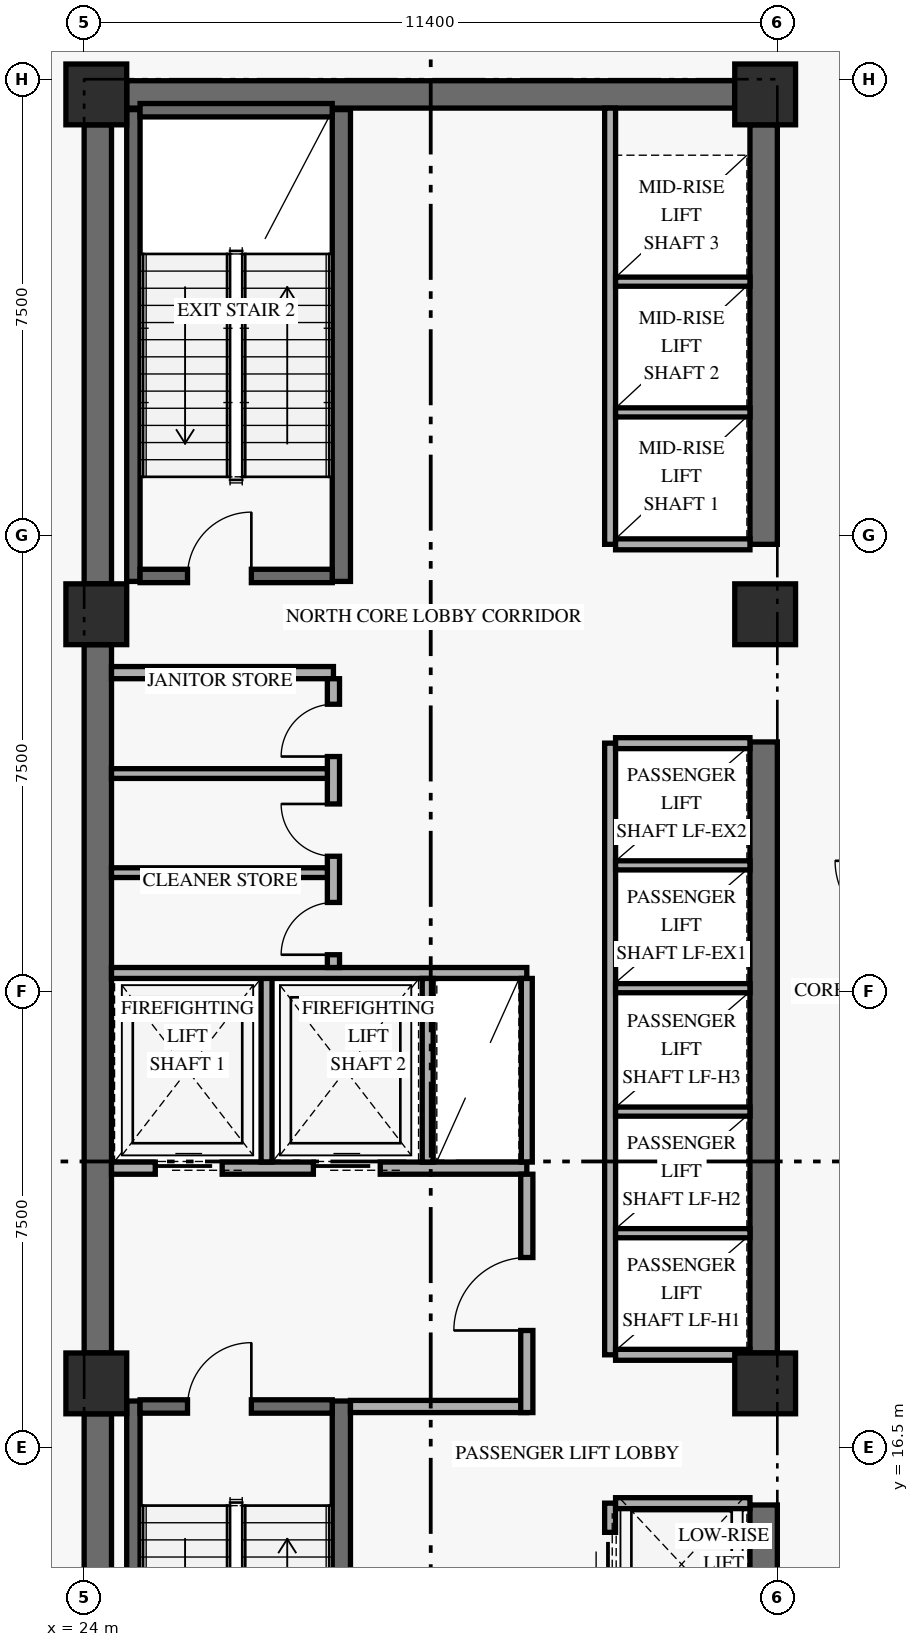
"""IFC4 building model, lengths in metres.
Left out: names, types, materials, properties, quantities, classifications, styles, units other than length and angle.
Written with IfcOpenShell. Run it as: python <this file> out.ifc"""

import sys

from ifc_helpers import new_model, si_unit, direction, frame, frame_2d, origin, origin_2d, place, context, subcontext, project, spatial, rectangle, extrude, element, fill, save


model = new_model("IFC4")
c1 = context("Model", 3, precision=1e-05, world=origin(), true_north=direction((0.0, 1.0)))
c2 = subcontext(c1, "Body", "Model", "MODEL_VIEW")
j1 = project(units=[si_unit("LENGTHUNIT", "METRE"), si_unit("PLANEANGLEUNIT", "RADIAN")], contexts=[c1])
p1 = place(None, origin())
s1 = spatial("IfcSite", under=j1, at=p1, CompositionType="ELEMENT")
p2 = place(p1, origin())
s2 = spatial("IfcBuilding", under=s1, at=p2, CompositionType="ELEMENT")
p3 = place(p2, frame((0.0, 0.0, 14.4)))
s3 = spatial("IfcBuildingStorey", under=s2, at=p3, CompositionType="ELEMENT", Elevation=14.4)
p4 = place(p3, frame((24.225, 9.75, 0.0), z_axis=(0.0, 0.0, 1.0), x_axis=(0.0, 1.0, 0.0)))
e1 = element("IfcWall", 1, at=p4, inside=s3, PredefinedType="SHEAR", context=c2, shape_type="SweptSolid", body=[
    extrude(rectangle(XDim=7.3, YDim=0.45, at=frame_2d((3.65, 0.0))), origin(), (0.0, 0.0, 1.0), 3.62),
])
p5 = place(p3, frame((24.225, 18.05, 0.0), z_axis=(0.0, 0.0, 1.0), x_axis=(0.0, 1.0, 0.0)))
e2 = element("IfcWall", 2, at=p5, inside=s3, PredefinedType="SHEAR", context=c2, shape_type="SweptSolid", body=[
    extrude(rectangle(XDim=11.65, YDim=0.45, at=frame_2d((5.825, 0.0))), origin(), (0.0, 0.0, 1.0), 3.62),
])
p6 = place(p3, frame((24.225, 30.7, 0.0), z_axis=(0.0, 0.0, 1.0), x_axis=(0.0, 1.0, 0.0)))
e3 = element("IfcWall", 3, at=p6, inside=s3, PredefinedType="SHEAR", context=c2, shape_type="SweptSolid", body=[
    extrude(rectangle(XDim=7.55, YDim=0.45, at=frame_2d((3.775, 0.0))), origin(), (0.0, 0.0, 1.0), 3.62),
])
p7 = place(p3, frame((35.175, 9.75, 0.0), z_axis=(0.0, 0.0, 1.0), x_axis=(0.0, 1.0, 0.0)))
e4 = element("IfcWall", 4, at=p7, inside=s3, PredefinedType="SHEAR", context=c2, shape_type="SweptSolid", body=[
    extrude(rectangle(XDim=5.8, YDim=0.45, at=frame_2d((2.9, 0.0))), origin(), (0.0, 0.0, 1.0), 3.62),
])
p8 = place(p3, frame((35.175, 18.05, 0.0), z_axis=(0.0, 0.0, 1.0), x_axis=(0.0, 1.0, 0.0)))
e5 = element("IfcWall", 5, at=p8, inside=s3, PredefinedType="SHEAR", context=c2, shape_type="SweptSolid", body=[
    extrude(rectangle(XDim=10.05, YDim=0.45, at=frame_2d((5.025, 0.0))), origin(), (0.0, 0.0, 1.0), 3.62),
])
p9 = place(p3, frame((35.175, 31.35, 0.0), z_axis=(0.0, 0.0, 1.0), x_axis=(0.0, 1.0, 0.0)))
e6 = element("IfcWall", 6, at=p9, inside=s3, PredefinedType="SHEAR", context=c2, shape_type="SweptSolid", body=[
    extrude(rectangle(XDim=6.9, YDim=0.45, at=frame_2d((3.45, 0.0))), origin(), (0.0, 0.0, 1.0), 3.62),
])
p10 = place(p3, frame((24.7, 38.75, 0.0), z_axis=(0.0, 0.0, 1.0), x_axis=(1.0, 0.0, 0.0)))
e7 = element("IfcWall", 7, at=p10, inside=s3, PredefinedType="SHEAR", context=c2, shape_type="SweptSolid", body=[
    extrude(rectangle(XDim=10.0, YDim=0.45, at=frame_2d((5.0, 0.0))), origin(), (0.0, 0.0, 1.0), 4.39),
])
p11 = place(p3, frame((24.81, 9.5, 0.0), z_axis=(0.0, 0.0, 1.0), x_axis=(0.0, 1.0, 0.0)))
e8 = element("IfcWall", 8, at=p11, inside=s3, PredefinedType="SHEAR", context=c2, shape_type="SweptSolid", body=[
    extrude(rectangle(XDim=7.76, YDim=0.22, at=frame_2d((3.88, 0.0))), origin(), (0.0, 0.0, 1.0), 4.39),
])
p12 = place(p3, frame((28.23, 9.5, 0.0), z_axis=(0.0, 0.0, 1.0), x_axis=(0.0, 1.0, 0.0)))
e9 = element("IfcWall", 9, at=p12, inside=s3, PredefinedType="SHEAR", context=c2, shape_type="SweptSolid", body=[
    extrude(rectangle(XDim=7.76, YDim=0.3, at=frame_2d((3.88, 0.0))), origin(), (0.0, 0.0, 1.0), 4.39),
])
p13 = place(p3, frame((24.92, 17.17, 0.0), z_axis=(0.0, 0.0, 1.0), x_axis=(1.0, 0.0, 0.0)))
e10 = element("IfcWall", 10, at=p13, inside=s3, PredefinedType="SHEAR", context=c2, shape_type="SweptSolid", body=[
    extrude(rectangle(XDim=3.16, YDim=0.22, at=frame_2d((1.58, 0.0))), origin(), (0.0, 0.0, 1.0), 4.39),
])
p14 = place(p13, frame((0.78, 0.0, 0.0)))
e11 = element("IfcOpeningElement", 11, at=p14, cuts=e10, PredefinedType="OPENING", context=c2, shape_type="SweptSolid", body=[
    extrude(rectangle(XDim=1.05, YDim=2.15, at=frame_2d((0.525, 1.075))), frame((0.0, 0.12, 0.0), z_axis=(0.0, -1.0, 0.0), x_axis=(1.0, 0.0, 0.0)), (0.0, 0.0, 1.0), 0.24),
])
p15 = place(p3, frame((24.81, 30.74, 0.0), z_axis=(0.0, 0.0, 1.0), x_axis=(0.0, 1.0, 0.0)))
e12 = element("IfcWall", 12, at=p15, inside=s3, PredefinedType="SHEAR", context=c2, shape_type="SweptSolid", body=[
    extrude(rectangle(XDim=7.76, YDim=0.22, at=frame_2d((3.88, 0.0))), origin(), (0.0, 0.0, 1.0), 4.39),
])
p16 = place(p3, frame((28.23, 30.74, 0.0), z_axis=(0.0, 0.0, 1.0), x_axis=(0.0, 1.0, 0.0)))
e13 = element("IfcWall", 13, at=p16, inside=s3, PredefinedType="SHEAR", context=c2, shape_type="SweptSolid", body=[
    extrude(rectangle(XDim=7.76, YDim=0.3, at=frame_2d((3.88, 0.0))), origin(), (0.0, 0.0, 1.0), 4.39),
])
p17 = place(p3, frame((24.92, 30.83, 0.0), z_axis=(0.0, 0.0, 1.0), x_axis=(1.0, 0.0, 0.0)))
e14 = element("IfcWall", 14, at=p17, inside=s3, PredefinedType="SHEAR", context=c2, shape_type="SweptSolid", body=[
    extrude(rectangle(XDim=3.16, YDim=0.22, at=frame_2d((1.58, 0.0))), origin(), (0.0, 0.0, 1.0), 4.39),
])
p18 = place(p17, frame((0.78, 0.0, 0.0)))
e15 = element("IfcOpeningElement", 15, at=p18, cuts=e14, PredefinedType="OPENING", context=c2, shape_type="SweptSolid", body=[
    extrude(rectangle(XDim=1.05, YDim=2.15, at=frame_2d((0.525, 1.075))), frame((0.0, 0.12, 0.0), z_axis=(0.0, -1.0, 0.0), x_axis=(1.0, 0.0, 0.0)), (0.0, 0.0, 1.0), 0.24),
])
p19 = place(p3, frame((24.92, 38.49, 0.0), z_axis=(0.0, 0.0, 1.0), x_axis=(1.0, 0.0, 0.0)))
e16 = element("IfcWall", 16, at=p19, inside=s3, PredefinedType="SHEAR", context=c2, shape_type="SweptSolid", body=[
    extrude(rectangle(XDim=3.16, YDim=0.22, at=frame_2d((1.58, 0.0))), origin(), (0.0, 0.0, 1.0), 4.39),
])
for number, where, z_axis, x_axis in (
    (17, (24.2, 17.55, 0.0), (0.0, 0.0, 1.0), (1.0, 0.0, 0.0)),
    (18, (24.2, 30.2, 0.0), (0.0, 0.0, 1.0), (1.0, 0.0, 0.0)),
    (19, (24.2, 38.75, 0.0), (0.0, 0.0, 1.0), (1.0, 0.0, 0.0)),
    (20, (35.2, 17.55, 0.0), (0.0, 0.0, 1.0), (1.0, 0.0, 0.0)),
    (21, (35.2, 30.2, 0.0), (0.0, 0.0, 1.0), (1.0, 0.0, 0.0)),
    (22, (35.2, 38.75, 0.0), (0.0, 0.0, 1.0), (1.0, 0.0, 0.0)),
):
    element("IfcColumn", number, at=place(p3, frame(where, z_axis=z_axis, x_axis=x_axis)), inside=s3, PredefinedType="COLUMN", context=c2, shape_type="SweptSolid", body=[
        extrude(rectangle(XDim=1.0, YDim=1.0, at=origin_2d()), origin(), (0.0, 0.0, 1.0), 4.8),
    ])
p20 = place(p3, frame((24.45, 21.09, 0.0), z_axis=(0.0, 0.0, 1.0), x_axis=(1.0, 0.0, 0.0)))
e23 = element("IfcWall", 23, at=p20, inside=s3, PredefinedType="STANDARD", context=c2, shape_type="SweptSolid", body=[
    extrude(rectangle(XDim=6.83, YDim=0.2, at=frame_2d((3.415, 0.0))), origin(), (0.0, 0.0, 1.0), 4.39),
])
p21 = place(p20, frame((0.72, 0.0, 0.0)))
e24 = element("IfcOpeningElement", 24, at=p21, cuts=e23, PredefinedType="OPENING", context=c2, shape_type="SweptSolid", body=[
    extrude(rectangle(XDim=1.1, YDim=2.2, at=frame_2d((0.55, 1.1))), frame((0.0, 0.11, 0.0), z_axis=(0.0, -1.0, 0.0), x_axis=(1.0, 0.0, 0.0)), (0.0, 0.0, 1.0), 0.22),
])
p22 = place(p20, frame((3.32, 0.0, 0.0)))
e25 = element("IfcOpeningElement", 25, at=p22, cuts=e23, PredefinedType="OPENING", context=c2, shape_type="SweptSolid", body=[
    extrude(rectangle(XDim=1.1, YDim=2.2, at=frame_2d((0.55, 1.1))), frame((0.0, 0.11, 0.0), z_axis=(0.0, -1.0, 0.0), x_axis=(1.0, 0.0, 0.0)), (0.0, 0.0, 1.0), 0.22),
])
p23 = place(p3, frame((28.38, 17.17, 0.0), z_axis=(0.0, 0.0, 1.0), x_axis=(1.0, 0.0, 0.0)))
e26 = element("IfcWall", 26, at=p23, inside=s3, PredefinedType="STANDARD", context=c2, shape_type="SweptSolid", body=[
    extrude(rectangle(XDim=2.9, YDim=0.2, at=frame_2d((1.45, 0.0))), origin(), (0.0, 0.0, 1.0), 4.39),
])
p24 = place(p3, frame((31.28, 17.07, 0.0), z_axis=(0.0, 0.0, 1.0), x_axis=(0.0, 1.0, 0.0)))
e27 = element("IfcWall", 27, at=p24, inside=s3, PredefinedType="STANDARD", context=c2, shape_type="SweptSolid", body=[
    extrude(rectangle(XDim=3.92, YDim=0.2, at=frame_2d((1.96, 0.0))), origin(), (0.0, 0.0, 1.0), 3.445),
])
p25 = place(p24, frame((1.35, 0.0, 0.0)))
e28 = element("IfcOpeningElement", 28, at=p25, cuts=e27, PredefinedType="OPENING", context=c2, shape_type="SweptSolid", body=[
    extrude(rectangle(XDim=1.2, YDim=2.15, at=frame_2d((0.6, 1.075))), frame((0.0, 0.11, 0.0), z_axis=(0.0, -1.0, 0.0), x_axis=(1.0, 0.0, 0.0)), (0.0, 0.0, 1.0), 0.22),
])
p26 = place(p3, frame((27.0, 21.19, 0.0), z_axis=(0.0, 0.0, 1.0), x_axis=(0.0, 1.0, 0.0)))
e29 = element("IfcWall", 29, at=p26, inside=s3, PredefinedType="STANDARD", context=c2, shape_type="SweptSolid", body=[
    extrude(rectangle(XDim=3.11, YDim=0.18, at=frame_2d((1.555, 0.0))), origin(), (0.0, 0.0, 1.0), 4.39),
])
p27 = place(p3, frame((24.45, 24.3, 0.0), z_axis=(0.0, 0.0, 1.0), x_axis=(1.0, 0.0, 0.0)))
e30 = element("IfcWall", 30, at=p27, inside=s3, PredefinedType="STANDARD", context=c2, shape_type="SweptSolid", body=[
    extrude(rectangle(XDim=6.83, YDim=0.18, at=frame_2d((3.415, 0.0))), origin(), (0.0, 0.0, 1.0), 4.39),
])
for number, where, z_axis, x_axis in (
    (31, (29.65, 21.19, 0.0), (0.0, 0.0, 1.0), (0.0, 1.0, 0.0)),
    (32, (31.28, 21.19, 0.0), (0.0, 0.0, 1.0), (0.0, 1.0, 0.0)),
):
    element("IfcWall", number, at=place(p3, frame(where, z_axis=z_axis, x_axis=x_axis)), inside=s3, PredefinedType="STANDARD", context=c2, shape_type="SweptSolid", body=[
        extrude(rectangle(XDim=3.02, YDim=0.18, at=frame_2d((1.51, 0.0))), origin(), (0.0, 0.0, 1.0), 4.39),
    ])
p28 = place(p3, frame((24.45, 29.24, 0.0), z_axis=(0.0, 0.0, 1.0), x_axis=(1.0, 0.0, 0.0)))
e33 = element("IfcWall", 33, at=p28, inside=s3, PredefinedType="STANDARD", context=c2, shape_type="SweptSolid", body=[
    extrude(rectangle(XDim=3.65, YDim=0.2, at=frame_2d((1.825, 0.0))), origin(), (0.0, 0.0, 1.0), 4.39),
])
p29 = place(p3, frame((28.1, 24.39, 0.0), z_axis=(0.0, 0.0, 1.0), x_axis=(0.0, 1.0, 0.0)))
e34 = element("IfcWall", 34, at=p29, inside=s3, PredefinedType="STANDARD", context=c2, shape_type="SweptSolid", body=[
    extrude(rectangle(XDim=4.75, YDim=0.2, at=frame_2d((2.375, 0.0))), origin(), (0.0, 0.0, 1.0), 4.39),
])
p30 = place(p29, frame((0.21, 0.0, 0.0)))
e35 = element("IfcOpeningElement", 35, at=p30, cuts=e34, PredefinedType="OPENING", context=c2, shape_type="SweptSolid", body=[
    extrude(rectangle(XDim=0.86, YDim=2.1, at=frame_2d((0.43, 1.05))), frame((0.0, 0.11, 0.0), z_axis=(0.0, -1.0, 0.0), x_axis=(1.0, 0.0, 0.0)), (0.0, 0.0, 1.0), 0.22),
])
p31 = place(p29, frame((1.83, 0.0, 0.0)))
e36 = element("IfcOpeningElement", 36, at=p31, cuts=e34, PredefinedType="OPENING", context=c2, shape_type="SweptSolid", body=[
    extrude(rectangle(XDim=0.86, YDim=2.1, at=frame_2d((0.43, 1.05))), frame((0.0, 0.11, 0.0), z_axis=(0.0, -1.0, 0.0), x_axis=(1.0, 0.0, 0.0)), (0.0, 0.0, 1.0), 0.22),
])
p32 = place(p29, frame((3.47, 0.0, 0.0)))
e37 = element("IfcOpeningElement", 37, at=p32, cuts=e34, PredefinedType="OPENING", context=c2, shape_type="SweptSolid", body=[
    extrude(rectangle(XDim=0.86, YDim=2.1, at=frame_2d((0.43, 1.05))), frame((0.0, 0.11, 0.0), z_axis=(0.0, -1.0, 0.0), x_axis=(1.0, 0.0, 0.0)), (0.0, 0.0, 1.0), 0.22),
])
for number, where, z_axis, x_axis in (
    (38, (24.45, 25.95, 0.0), (0.0, 0.0, 1.0), (1.0, 0.0, 0.0)),
    (39, (24.45, 27.58, 0.0), (0.0, 0.0, 1.0), (1.0, 0.0, 0.0)),
):
    element("IfcWall", number, at=place(p3, frame(where, z_axis=z_axis, x_axis=x_axis)), inside=s3, PredefinedType="PARTITIONING", context=c2, shape_type="SweptSolid", body=[
        extrude(rectangle(XDim=3.55, YDim=0.16, at=frame_2d((1.775, 0.0))), origin(), (0.0, 0.0, 1.0), 4.39),
    ])
p33 = place(p3, frame((32.65, 9.5, 0.0), z_axis=(0.0, 0.0, 1.0), x_axis=(0.0, 1.0, 0.0)))
e40 = element("IfcWall", 40, at=p33, inside=s3, PredefinedType="STANDARD", context=c2, shape_type="SweptSolid", body=[
    extrude(rectangle(XDim=6.08, YDim=0.18, at=frame_2d((3.04, 0.0))), origin(), (0.0, 0.0, 1.0), 4.39),
])
p34 = place(p33, frame((0.55, 0.0, 0.0)))
e41 = element("IfcOpeningElement", 41, at=p34, cuts=e40, PredefinedType="OPENING", context=c2, shape_type="SweptSolid", body=[
    extrude(rectangle(XDim=1.05, YDim=2.2, at=frame_2d((0.525, 1.1))), frame((0.0, 0.1, 0.0), z_axis=(0.0, -1.0, 0.0), x_axis=(1.0, 0.0, 0.0)), (0.0, 0.0, 1.0), 0.2),
])
p35 = place(p33, frame((2.55, 0.0, 0.0)))
e42 = element("IfcOpeningElement", 42, at=p35, cuts=e40, PredefinedType="OPENING", context=c2, shape_type="SweptSolid", body=[
    extrude(rectangle(XDim=1.05, YDim=2.2, at=frame_2d((0.525, 1.1))), frame((0.0, 0.1, 0.0), z_axis=(0.0, -1.0, 0.0), x_axis=(1.0, 0.0, 0.0)), (0.0, 0.0, 1.0), 0.2),
])
p36 = place(p33, frame((4.55, 0.0, 0.0)))
e43 = element("IfcOpeningElement", 43, at=p36, cuts=e40, PredefinedType="OPENING", context=c2, shape_type="SweptSolid", body=[
    extrude(rectangle(XDim=1.05, YDim=2.2, at=frame_2d((0.525, 1.1))), frame((0.0, 0.1, 0.0), z_axis=(0.0, -1.0, 0.0), x_axis=(1.0, 0.0, 0.0)), (0.0, 0.0, 1.0), 0.2),
])
p37 = place(p3, frame((32.74, 15.58, 0.0), z_axis=(0.0, 0.0, 1.0), x_axis=(1.0, 0.0, 0.0)))
e44 = element("IfcWall", 44, at=p37, inside=s3, PredefinedType="STANDARD", context=c2, shape_type="SweptSolid", body=[
    extrude(rectangle(XDim=2.21, YDim=0.18, at=frame_2d((1.105, 0.0))), origin(), (0.0, 0.0, 1.0), 4.39),
])
p38 = place(p3, frame((32.65, 18.02, 0.0), z_axis=(0.0, 0.0, 1.0), x_axis=(0.0, 1.0, 0.0)))
e45 = element("IfcWall", 45, at=p38, inside=s3, PredefinedType="STANDARD", context=c2, shape_type="SweptSolid", body=[
    extrude(rectangle(XDim=10.06, YDim=0.18, at=frame_2d((5.03, 0.0))), origin(), (0.0, 0.0, 1.0), 4.39),
])
for number, where, z_axis, x_axis in (
    (46, (32.74, 18.02, 0.0), (0.0, 0.0, 1.0), (1.0, 0.0, 0.0)),
    (47, (32.74, 28.08, 0.0), (0.0, 0.0, 1.0), (1.0, 0.0, 0.0)),
):
    element("IfcWall", number, at=place(p3, frame(where, z_axis=z_axis, x_axis=x_axis)), inside=s3, PredefinedType="STANDARD", context=c2, shape_type="SweptSolid", body=[
        extrude(rectangle(XDim=2.21, YDim=0.18, at=frame_2d((1.105, 0.0))), origin(), (0.0, 0.0, 1.0), 4.39),
    ])
for number, where, z_axis, x_axis in (
    (48, (32.74, 20.02, 0.0), (0.0, 0.0, 1.0), (1.0, 0.0, 0.0)),
    (49, (32.74, 22.02, 0.0), (0.0, 0.0, 1.0), (1.0, 0.0, 0.0)),
    (50, (32.74, 24.05, 0.0), (0.0, 0.0, 1.0), (1.0, 0.0, 0.0)),
    (51, (32.74, 26.07, 0.0), (0.0, 0.0, 1.0), (1.0, 0.0, 0.0)),
):
    element("IfcWall", number, at=place(p3, frame(where, z_axis=z_axis, x_axis=x_axis)), inside=s3, PredefinedType="STANDARD", context=c2, shape_type="SweptSolid", body=[
        extrude(rectangle(XDim=2.21, YDim=0.15, at=frame_2d((1.105, 0.0))), origin(), (0.0, 0.0, 1.0), 4.39),
    ])
p39 = place(p3, frame((32.65, 31.35, 0.0), z_axis=(0.0, 0.0, 1.0), x_axis=(0.0, 1.0, 0.0)))
e52 = element("IfcWall", 52, at=p39, inside=s3, PredefinedType="STANDARD", context=c2, shape_type="SweptSolid", body=[
    extrude(rectangle(XDim=7.175, YDim=0.18, at=frame_2d((3.587, 0.0))), origin(), (0.0, 0.0, 1.0), 4.39),
])
p40 = place(p3, frame((32.74, 31.35, 0.0), z_axis=(0.0, 0.0, 1.0), x_axis=(1.0, 0.0, 0.0)))
e53 = element("IfcWall", 53, at=p40, inside=s3, PredefinedType="STANDARD", context=c2, shape_type="SweptSolid", body=[
    extrude(rectangle(XDim=2.21, YDim=0.18, at=frame_2d((1.105, 0.0))), origin(), (0.0, 0.0, 1.0), 4.39),
])
for number, where, z_axis, x_axis in (
    (54, (32.74, 33.52, 0.0), (0.0, 0.0, 1.0), (1.0, 0.0, 0.0)),
    (55, (32.74, 35.67, 0.0), (0.0, 0.0, 1.0), (1.0, 0.0, 0.0)),
):
    element("IfcWall", number, at=place(p3, frame(where, z_axis=z_axis, x_axis=x_axis)), inside=s3, PredefinedType="STANDARD", context=c2, shape_type="SweptSolid", body=[
        extrude(rectangle(XDim=2.21, YDim=0.15, at=frame_2d((1.105, 0.0))), origin(), (0.0, 0.0, 1.0), 4.39),
    ])
p41 = place(p14, frame((1.05, 0.0, 0.0), z_axis=(0.0, 0.0, 1.0), x_axis=(-1.0, 0.0, 0.0)))
e56 = element("IfcDoor", 56, at=p41, inside=s3, OperationType="SINGLE_SWING_LEFT", PredefinedType="DOOR", context=c2, shape_type="SweptSolid", body=[
    extrude(rectangle(XDim=1.05, YDim=2.15, at=frame_2d((0.525, 1.075))), frame((0.0, 0.025, 0.0), z_axis=(0.0, -1.0, 0.0), x_axis=(1.0, 0.0, 0.0)), (0.0, 0.0, 1.0), 0.05),
])
fill(e11, e56)
p42 = place(p18, origin())
e57 = element("IfcDoor", 57, at=p42, inside=s3, OperationType="SINGLE_SWING_RIGHT", PredefinedType="DOOR", context=c2, shape_type="SweptSolid", body=[
    extrude(rectangle(XDim=1.05, YDim=2.15, at=frame_2d((0.525, 1.075))), frame((0.0, 0.025, 0.0), z_axis=(0.0, -1.0, 0.0), x_axis=(1.0, 0.0, 0.0)), (0.0, 0.0, 1.0), 0.05),
])
fill(e15, e57)
p43 = place(p21, origin())
e58 = element("IfcDoor", 58, at=p43, inside=s3, OperationType="SLIDING_TO_LEFT", PredefinedType="DOOR", context=c2, shape_type="SweptSolid", body=[
    extrude(rectangle(XDim=1.1, YDim=2.2, at=frame_2d((0.55, 1.1))), frame((0.0, 0.025, 0.0), z_axis=(0.0, -1.0, 0.0), x_axis=(1.0, 0.0, 0.0)), (0.0, 0.0, 1.0), 0.05),
])
fill(e24, e58)
p44 = place(p22, origin())
e59 = element("IfcDoor", 59, at=p44, inside=s3, OperationType="SLIDING_TO_LEFT", PredefinedType="DOOR", context=c2, shape_type="SweptSolid", body=[
    extrude(rectangle(XDim=1.1, YDim=2.2, at=frame_2d((0.55, 1.1))), frame((0.0, 0.025, 0.0), z_axis=(0.0, -1.0, 0.0), x_axis=(1.0, 0.0, 0.0)), (0.0, 0.0, 1.0), 0.05),
])
fill(e25, e59)
p45 = place(p25, origin())
e60 = element("IfcDoor", 60, at=p45, inside=s3, OperationType="SINGLE_SWING_LEFT", PredefinedType="DOOR", context=c2, shape_type="SweptSolid", body=[
    extrude(rectangle(XDim=1.2, YDim=2.15, at=frame_2d((0.6, 1.075))), frame((0.0, 0.025, 0.0), z_axis=(0.0, -1.0, 0.0), x_axis=(1.0, 0.0, 0.0)), (0.0, 0.0, 1.0), 0.05),
])
fill(e28, e60)
p46 = place(p30, origin())
e61 = element("IfcDoor", 61, at=p46, inside=s3, OperationType="SINGLE_SWING_LEFT", PredefinedType="DOOR", context=c2, shape_type="SweptSolid", body=[
    extrude(rectangle(XDim=0.86, YDim=2.1, at=frame_2d((0.43, 1.05))), frame((0.0, 0.025, 0.0), z_axis=(0.0, -1.0, 0.0), x_axis=(1.0, 0.0, 0.0)), (0.0, 0.0, 1.0), 0.05),
])
fill(e35, e61)
p47 = place(p31, origin())
e62 = element("IfcDoor", 62, at=p47, inside=s3, OperationType="SINGLE_SWING_RIGHT", PredefinedType="DOOR", context=c2, shape_type="SweptSolid", body=[
    extrude(rectangle(XDim=0.86, YDim=2.1, at=frame_2d((0.43, 1.05))), frame((0.0, 0.025, 0.0), z_axis=(0.0, -1.0, 0.0), x_axis=(1.0, 0.0, 0.0)), (0.0, 0.0, 1.0), 0.05),
])
fill(e36, e62)
p48 = place(p32, origin())
e63 = element("IfcDoor", 63, at=p48, inside=s3, OperationType="SINGLE_SWING_LEFT", PredefinedType="DOOR", context=c2, shape_type="SweptSolid", body=[
    extrude(rectangle(XDim=0.86, YDim=2.1, at=frame_2d((0.43, 1.05))), frame((0.0, 0.025, 0.0), z_axis=(0.0, -1.0, 0.0), x_axis=(1.0, 0.0, 0.0)), (0.0, 0.0, 1.0), 0.05),
])
fill(e37, e63)
p49 = place(p36, origin())
e64 = element("IfcDoor", 64, at=p49, inside=s3, OperationType="SLIDING_TO_LEFT", PredefinedType="DOOR", context=c2, shape_type="SweptSolid", body=[
    extrude(rectangle(XDim=1.05, YDim=2.2, at=frame_2d((0.525, 1.1))), frame((0.0, 0.025, 0.0), z_axis=(0.0, -1.0, 0.0), x_axis=(1.0, 0.0, 0.0)), (0.0, 0.0, 1.0), 0.05),
])
fill(e43, e64)
save(model, sys.argv[1])
